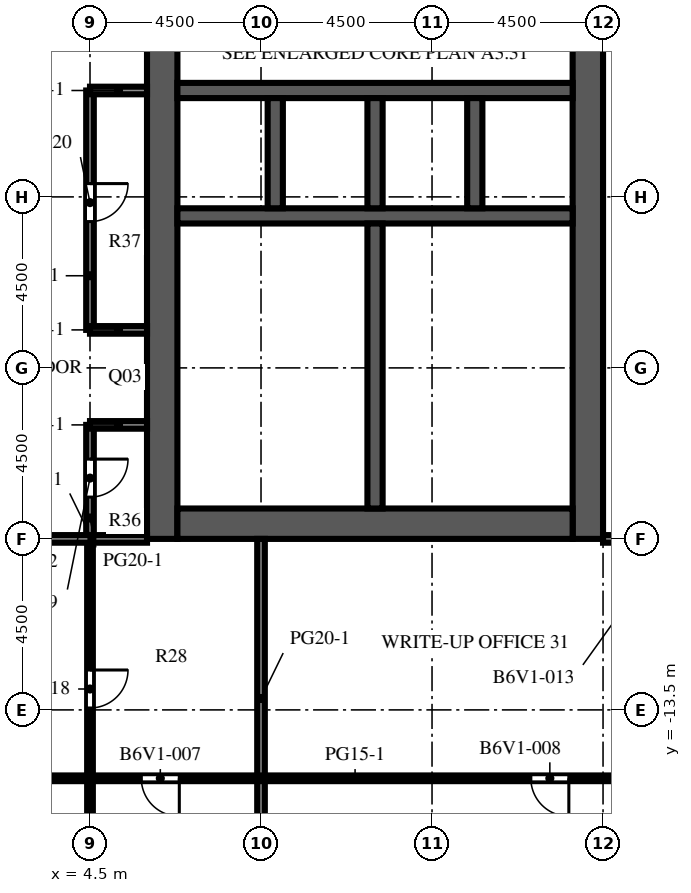
"""IFC4 building model, lengths in metres.
Left out: names, types, materials, properties, quantities, classifications, styles, units other than length and angle.
Written with IfcOpenShell. Run it as: python <this file> out.ifc"""

import sys

from ifc_helpers import new_model, si_unit, direction, frame, frame_2d, origin, place, context, subcontext, project, spatial, rectangle, extrude, element, fill, save


model = new_model("IFC4")
c1 = context("Model", 3, precision=1e-05, world=origin(), true_north=direction((0.0, 1.0)))
c2 = subcontext(c1, "Body", "Model", "MODEL_VIEW")
j1 = project(units=[si_unit("LENGTHUNIT", "METRE"), si_unit("PLANEANGLEUNIT", "RADIAN")], contexts=[c1])
p1 = place(None, origin())
s1 = spatial("IfcSite", under=j1, at=p1, CompositionType="ELEMENT")
p2 = place(p1, origin())
s2 = spatial("IfcBuilding", under=s1, at=p2, CompositionType="ELEMENT")
p3 = place(p2, frame((0.0, 0.0, 207.9)))
s3 = spatial("IfcBuildingStorey", under=s2, at=p3, CompositionType="ELEMENT", Elevation=207.9)
p4 = place(p3, frame((6.4, -9.0, 0.0), z_axis=(0.0, 0.0, 1.0), x_axis=(0.0, 1.0, 0.0)))
e1 = element("IfcWall", 1, at=p4, inside=s3, PredefinedType="SHEAR", context=c2, shape_type="SweptSolid", body=[
    extrude(rectangle(XDim=27.5, YDim=0.8, at=frame_2d((13.75, 0.0))), origin(), (0.0, 0.0, 1.0), 4.1),
])
p5 = place(p4, frame((12.55, 0.0, 0.0)))
e2 = element("IfcOpeningElement", 2, at=p5, cuts=e1, PredefinedType="OPENING", context=c2, shape_type="SweptSolid", body=[
    extrude(rectangle(XDim=2.4, YDim=2.4, at=frame_2d((1.2, 1.2))), frame((0.0, 0.41, 0.0), z_axis=(0.0, -1.0, 0.0), x_axis=(1.0, 0.0, 0.0)), (0.0, 0.0, 1.0), 0.82),
])
p6 = place(p4, frame((3.95, 0.0, 0.0)))
e3 = element("IfcOpeningElement", 3, at=p6, cuts=e1, PredefinedType="OPENING", context=c2, shape_type="SweptSolid", body=[
    extrude(rectangle(XDim=1.2, YDim=2.1, at=frame_2d((0.6, 1.05))), frame((0.0, 0.41, 0.0), z_axis=(0.0, -1.0, 0.0), x_axis=(1.0, 0.0, 0.0)), (0.0, 0.0, 1.0), 0.82),
])
p7 = place(p4, frame((22.35, 0.0, 0.0)))
e4 = element("IfcOpeningElement", 4, at=p7, cuts=e1, PredefinedType="OPENING", context=c2, shape_type="SweptSolid", body=[
    extrude(rectangle(XDim=1.2, YDim=2.1, at=frame_2d((0.6, 1.05))), frame((0.0, 0.41, 0.0), z_axis=(0.0, -1.0, 0.0), x_axis=(1.0, 0.0, 0.0)), (0.0, 0.0, 1.0), 0.82),
])
p8 = place(p3, frame((17.6, -9.0, 0.0), z_axis=(0.0, 0.0, 1.0), x_axis=(0.0, 1.0, 0.0)))
e5 = element("IfcWall", 5, at=p8, inside=s3, PredefinedType="SHEAR", context=c2, shape_type="SweptSolid", body=[
    extrude(rectangle(XDim=27.5, YDim=0.8, at=frame_2d((13.75, 0.0))), origin(), (0.0, 0.0, 1.0), 4.1),
])
p9 = place(p8, frame((12.55, 0.0, 0.0)))
e6 = element("IfcOpeningElement", 6, at=p9, cuts=e5, PredefinedType="OPENING", context=c2, shape_type="SweptSolid", body=[
    extrude(rectangle(XDim=2.4, YDim=2.4, at=frame_2d((1.2, 1.2))), frame((0.0, 0.41, 0.0), z_axis=(0.0, -1.0, 0.0), x_axis=(1.0, 0.0, 0.0)), (0.0, 0.0, 1.0), 0.82),
])
p10 = place(p8, frame((6.825, 0.0, 0.0)))
e7 = element("IfcOpeningElement", 7, at=p10, cuts=e5, PredefinedType="OPENING", context=c2, shape_type="SweptSolid", body=[
    extrude(rectangle(XDim=1.2, YDim=2.1, at=frame_2d((0.6, 1.05))), frame((0.0, 0.41, 0.0), z_axis=(0.0, -1.0, 0.0), x_axis=(1.0, 0.0, 0.0)), (0.0, 0.0, 1.0), 0.82),
])
p11 = place(p8, frame((19.475, 0.0, 0.0)))
e8 = element("IfcOpeningElement", 8, at=p11, cuts=e5, PredefinedType="OPENING", context=c2, shape_type="SweptSolid", body=[
    extrude(rectangle(XDim=1.2, YDim=2.1, at=frame_2d((0.6, 1.05))), frame((0.0, 0.41, 0.0), z_axis=(0.0, -1.0, 0.0), x_axis=(1.0, 0.0, 0.0)), (0.0, 0.0, 1.0), 0.82),
])
p12 = place(p3, frame((6.8, -8.6, 0.0), z_axis=(0.0, 0.0, 1.0), x_axis=(1.0, 0.0, 0.0)))
e9 = element("IfcWall", 9, at=p12, inside=s3, PredefinedType="SHEAR", context=c2, shape_type="SweptSolid", body=[
    extrude(rectangle(XDim=10.4, YDim=0.8, at=frame_2d((5.2, 0.0))), origin(), (0.0, 0.0, 1.0), 4.1),
])
p13 = place(p3, frame((6.8, -0.5, 0.0), z_axis=(0.0, 0.0, 1.0), x_axis=(1.0, 0.0, 0.0)))
e10 = element("IfcWall", 10, at=p13, inside=s3, PredefinedType="SHEAR", context=c2, shape_type="SweptSolid", body=[
    extrude(rectangle(XDim=10.4, YDim=0.4, at=frame_2d((5.2, 0.0))), origin(), (0.0, 0.0, 1.0), 4.1),
])
p14 = place(p3, frame((6.8, 2.8, 0.0), z_axis=(0.0, 0.0, 1.0), x_axis=(1.0, 0.0, 0.0)))
e11 = element("IfcWall", 11, at=p14, inside=s3, PredefinedType="SHEAR", context=c2, shape_type="SweptSolid", body=[
    extrude(rectangle(XDim=10.4, YDim=0.4, at=frame_2d((5.2, 0.0))), origin(), (0.0, 0.0, 1.0), 4.1),
])
p15 = place(p14, frame((0.738, 0.0, 0.0)))
e12 = element("IfcOpeningElement", 12, at=p15, cuts=e11, PredefinedType="OPENING", context=c2, shape_type="SweptSolid", body=[
    extrude(rectangle(XDim=1.1, YDim=2.1, at=frame_2d((0.55, 1.05))), frame((0.0, 0.21, 0.0), z_axis=(0.0, -1.0, 0.0), x_axis=(1.0, 0.0, 0.0)), (0.0, 0.0, 1.0), 0.42),
])
p16 = place(p14, frame((3.337, 0.0, 0.0)))
e13 = element("IfcOpeningElement", 13, at=p16, cuts=e11, PredefinedType="OPENING", context=c2, shape_type="SweptSolid", body=[
    extrude(rectangle(XDim=1.1, YDim=2.1, at=frame_2d((0.55, 1.05))), frame((0.0, 0.21, 0.0), z_axis=(0.0, -1.0, 0.0), x_axis=(1.0, 0.0, 0.0)), (0.0, 0.0, 1.0), 0.42),
])
p17 = place(p14, frame((6.012, 0.0, 0.0)))
e14 = element("IfcOpeningElement", 14, at=p17, cuts=e11, PredefinedType="OPENING", context=c2, shape_type="SweptSolid", body=[
    extrude(rectangle(XDim=1.0, YDim=2.1, at=frame_2d((0.5, 1.05))), frame((0.0, 0.21, 0.0), z_axis=(0.0, -1.0, 0.0), x_axis=(1.0, 0.0, 0.0)), (0.0, 0.0, 1.0), 0.42),
])
p18 = place(p14, frame((8.613, 0.0, 0.0)))
e15 = element("IfcOpeningElement", 15, at=p18, cuts=e11, PredefinedType="OPENING", context=c2, shape_type="SweptSolid", body=[
    extrude(rectangle(XDim=1.0, YDim=2.1, at=frame_2d((0.5, 1.05))), frame((0.0, 0.21, 0.0), z_axis=(0.0, -1.0, 0.0), x_axis=(1.0, 0.0, 0.0)), (0.0, 0.0, 1.0), 0.42),
])
for number, where, z_axis, x_axis in (
    (16, (9.375, -0.3, 0.0), (0.0, 0.0, 1.0), (0.0, 1.0, 0.0)),
    (17, (12.0, -0.3, 0.0), (0.0, 0.0, 1.0), (0.0, 1.0, 0.0)),
    (18, (14.625, -0.3, 0.0), (0.0, 0.0, 1.0), (0.0, 1.0, 0.0)),
):
    element("IfcWall", number, at=place(p3, frame(where, z_axis=z_axis, x_axis=x_axis)), inside=s3, PredefinedType="SHEAR", context=c2, shape_type="SweptSolid", body=[
        extrude(rectangle(XDim=2.9, YDim=0.4, at=frame_2d((1.45, 0.0))), origin(), (0.0, 0.0, 1.0), 4.1),
    ])
p19 = place(p3, frame((12.0, -8.2, 0.0), z_axis=(0.0, 0.0, 1.0), x_axis=(0.0, 1.0, 0.0)))
e19 = element("IfcWall", 19, at=p19, inside=s3, PredefinedType="SHEAR", context=c2, shape_type="SweptSolid", body=[
    extrude(rectangle(XDim=7.5, YDim=0.4, at=frame_2d((3.75, 0.0))), origin(), (0.0, 0.0, 1.0), 4.1),
])
p20 = place(p3, frame((8.3, -8.2, 0.0), z_axis=(0.0, 0.0, 1.0), x_axis=(0.0, 1.0, 0.0)))
e20 = element("IfcWall", 20, at=p20, inside=s3, PredefinedType="PARTITIONING", context=c2, shape_type="SweptSolid", body=[
    extrude(rectangle(XDim=2.25, YDim=0.1, at=frame_2d((1.125, 0.0))), origin(), (0.0, 0.0, 1.0), 3.65),
])
p21 = place(p20, frame((0.625, 0.0, 0.0)))
e21 = element("IfcOpeningElement", 21, at=p21, cuts=e20, PredefinedType="OPENING", context=c2, shape_type="SweptSolid", body=[
    extrude(rectangle(XDim=1.0, YDim=2.1, at=frame_2d((0.5, 1.05))), frame((0.0, 0.06, 0.0), z_axis=(0.0, -1.0, 0.0), x_axis=(1.0, 0.0, 0.0)), (0.0, 0.0, 1.0), 0.12),
])
p22 = place(p3, frame((8.3, -5.95, 0.0), z_axis=(0.0, 0.0, 1.0), x_axis=(0.0, 1.0, 0.0)))
e22 = element("IfcWall", 22, at=p22, inside=s3, PredefinedType="PARTITIONING", context=c2, shape_type="SweptSolid", body=[
    extrude(rectangle(XDim=2.25, YDim=0.1, at=frame_2d((1.125, 0.0))), origin(), (0.0, 0.0, 1.0), 3.65),
])
p23 = place(p22, frame((0.625, 0.0, 0.0)))
e23 = element("IfcOpeningElement", 23, at=p23, cuts=e22, PredefinedType="OPENING", context=c2, shape_type="SweptSolid", body=[
    extrude(rectangle(XDim=1.0, YDim=2.1, at=frame_2d((0.5, 1.05))), frame((0.0, 0.06, 0.0), z_axis=(0.0, -1.0, 0.0), x_axis=(1.0, 0.0, 0.0)), (0.0, 0.0, 1.0), 0.12),
])
p24 = place(p3, frame((8.3, -3.7, 0.0), z_axis=(0.0, 0.0, 1.0), x_axis=(0.0, 1.0, 0.0)))
e24 = element("IfcWall", 24, at=p24, inside=s3, PredefinedType="PARTITIONING", context=c2, shape_type="SweptSolid", body=[
    extrude(rectangle(XDim=1.65, YDim=0.1, at=frame_2d((0.825, 0.0))), origin(), (0.0, 0.0, 1.0), 3.65),
])
p25 = place(p24, frame((0.325, 0.0, 0.0)))
e25 = element("IfcOpeningElement", 25, at=p25, cuts=e24, PredefinedType="OPENING", context=c2, shape_type="SweptSolid", body=[
    extrude(rectangle(XDim=1.0, YDim=2.1, at=frame_2d((0.5, 1.05))), frame((0.0, 0.06, 0.0), z_axis=(0.0, -1.0, 0.0), x_axis=(1.0, 0.0, 0.0)), (0.0, 0.0, 1.0), 0.12),
])
p26 = place(p3, frame((8.3, -2.05, 0.0), z_axis=(0.0, 0.0, 1.0), x_axis=(0.0, 1.0, 0.0)))
e26 = element("IfcWall", 26, at=p26, inside=s3, PredefinedType="PARTITIONING", context=c2, shape_type="SweptSolid", body=[
    extrude(rectangle(XDim=1.35, YDim=0.1, at=frame_2d((0.675, 0.0))), origin(), (0.0, 0.0, 1.0), 3.65),
])
p27 = place(p26, frame((0.2, 0.0, 0.0)))
e27 = element("IfcOpeningElement", 27, at=p27, cuts=e26, PredefinedType="OPENING", context=c2, shape_type="SweptSolid", body=[
    extrude(rectangle(XDim=0.95, YDim=2.1, at=frame_2d((0.475, 1.05))), frame((0.0, 0.06, 0.0), z_axis=(0.0, -1.0, 0.0), x_axis=(1.0, 0.0, 0.0)), (0.0, 0.0, 1.0), 0.12),
])
for number, where, z_axis, x_axis in (
    (28, (8.3, -5.95, 0.0), (0.0, 0.0, 1.0), (1.0, 0.0, 0.0)),
    (29, (8.3, -3.7, 0.0), (0.0, 0.0, 1.0), (1.0, 0.0, 0.0)),
    (30, (8.3, -2.05, 0.0), (0.0, 0.0, 1.0), (1.0, 0.0, 0.0)),
):
    element("IfcWall", number, at=place(p3, frame(where, z_axis=z_axis, x_axis=x_axis)), inside=s3, PredefinedType="PARTITIONING", context=c2, shape_type="SweptSolid", body=[
        extrude(rectangle(XDim=3.5, YDim=0.1, at=frame_2d((1.75, 0.0))), origin(), (0.0, 0.0, 1.0), 3.65),
    ])
p28 = place(p3, frame((4.5, -9.0, 0.0), z_axis=(0.0, 0.0, 1.0), x_axis=(0.0, -1.0, 0.0)))
e31 = element("IfcWall", 31, at=p28, inside=s3, PredefinedType="PARTITIONING", context=c2, shape_type="SweptSolid", body=[
    extrude(rectangle(XDim=17.5, YDim=0.15, at=frame_2d((8.75, 0.0))), origin(), (0.0, 0.0, 1.0), 3.65),
])
p29 = place(p28, frame((3.45, 0.0, 0.0)))
e32 = element("IfcOpeningElement", 32, at=p29, cuts=e31, PredefinedType="OPENING", context=c2, shape_type="SweptSolid", body=[
    extrude(rectangle(XDim=1.0, YDim=2.1, at=frame_2d((0.5, 1.05))), frame((0.0, 0.085, 0.0), z_axis=(0.0, -1.0, 0.0), x_axis=(1.0, 0.0, 0.0)), (0.0, 0.0, 1.0), 0.17),
])
p30 = place(p3, frame((4.5, -6.0, 0.0), z_axis=(0.0, 0.0, 1.0), x_axis=(0.0, -1.0, 0.0)))
e33 = element("IfcWall", 33, at=p30, inside=s3, PredefinedType="PARTITIONING", context=c2, shape_type="SweptSolid", body=[
    extrude(rectangle(XDim=3.0, YDim=0.2, at=frame_2d((1.5, 0.0))), origin(), (0.0, 0.0, 1.0), 3.65),
])
p31 = place(p30, frame((0.9, 0.0, 0.0)))
e34 = element("IfcOpeningElement", 34, at=p31, cuts=e33, PredefinedType="OPENING", context=c2, shape_type="SweptSolid", body=[
    extrude(rectangle(XDim=1.0, YDim=2.1, at=frame_2d((0.5, 1.05))), frame((0.0, 0.11, 0.0), z_axis=(0.0, -1.0, 0.0), x_axis=(1.0, 0.0, 0.0)), (0.0, 0.0, 1.0), 0.22),
])
p32 = place(p3, frame((4.5, 2.8, 0.0), z_axis=(0.0, 0.0, 1.0), x_axis=(0.0, -1.0, 0.0)))
e35 = element("IfcWall", 35, at=p32, inside=s3, PredefinedType="PARTITIONING", context=c2, shape_type="SweptSolid", body=[
    extrude(rectangle(XDim=6.3, YDim=0.2, at=frame_2d((3.15, 0.0))), origin(), (0.0, 0.0, 1.0), 3.65),
])
p33 = place(p32, frame((2.45, 0.0, 0.0)))
e36 = element("IfcOpeningElement", 36, at=p33, cuts=e35, PredefinedType="OPENING", context=c2, shape_type="SweptSolid", body=[
    extrude(rectangle(XDim=1.0, YDim=2.1, at=frame_2d((0.5, 1.05))), frame((0.0, 0.11, 0.0), z_axis=(0.0, -1.0, 0.0), x_axis=(1.0, 0.0, 0.0)), (0.0, 0.0, 1.0), 0.22),
])
p34 = place(p3, frame((9.0, -17.4, 0.0), z_axis=(0.0, 0.0, 1.0), x_axis=(0.0, 1.0, 0.0)))
e37 = element("IfcWall", 37, at=p34, inside=s3, PredefinedType="PARTITIONING", context=c2, shape_type="SweptSolid", body=[
    extrude(rectangle(XDim=8.4, YDim=0.2, at=frame_2d((4.2, 0.0))), origin(), (0.0, 0.0, 1.0), 3.65),
])
p35 = place(p3, frame((21.0, -15.3, 0.0), z_axis=(0.0, 0.0, 1.0), x_axis=(-1.0, 0.0, 0.0)))
e38 = element("IfcWall", 38, at=p35, inside=s3, PredefinedType="PARTITIONING", context=c2, shape_type="SweptSolid", body=[
    extrude(rectangle(XDim=34.5, YDim=0.15, at=frame_2d((17.25, 0.0))), origin(), (0.0, 0.0, 1.0), 3.65),
])
p36 = place(p35, frame((28.9, 0.0, 0.0)))
e39 = element("IfcOpeningElement", 39, at=p36, cuts=e38, PredefinedType="OPENING", context=c2, shape_type="SweptSolid", body=[
    extrude(rectangle(XDim=1.0, YDim=2.1, at=frame_2d((0.5, 1.05))), frame((0.0, 0.085, 0.0), z_axis=(0.0, -1.0, 0.0), x_axis=(1.0, 0.0, 0.0)), (0.0, 0.0, 1.0), 0.17),
])
p37 = place(p35, frame((19.4, 0.0, 0.0)))
e40 = element("IfcOpeningElement", 40, at=p37, cuts=e38, PredefinedType="OPENING", context=c2, shape_type="SweptSolid", body=[
    extrude(rectangle(XDim=1.0, YDim=2.1, at=frame_2d((0.5, 1.05))), frame((0.0, 0.085, 0.0), z_axis=(0.0, -1.0, 0.0), x_axis=(1.0, 0.0, 0.0)), (0.0, 0.0, 1.0), 0.17),
])
p38 = place(p35, frame((14.15, 0.0, 0.0)))
e41 = element("IfcOpeningElement", 41, at=p38, cuts=e38, PredefinedType="OPENING", context=c2, shape_type="SweptSolid", body=[
    extrude(rectangle(XDim=1.0, YDim=2.1, at=frame_2d((0.5, 1.05))), frame((0.0, 0.085, 0.0), z_axis=(0.0, -1.0, 0.0), x_axis=(1.0, 0.0, 0.0)), (0.0, 0.0, 1.0), 0.17),
])
p39 = place(p35, frame((3.9, 0.0, 0.0)))
e42 = element("IfcOpeningElement", 42, at=p39, cuts=e38, PredefinedType="OPENING", context=c2, shape_type="SweptSolid", body=[
    extrude(rectangle(XDim=1.0, YDim=2.1, at=frame_2d((0.5, 1.05))), frame((0.0, 0.085, 0.0), z_axis=(0.0, -1.0, 0.0), x_axis=(1.0, 0.0, 0.0)), (0.0, 0.0, 1.0), 0.17),
])
p40 = place(p3, frame((6.0, -9.0, 0.0), z_axis=(0.0, 0.0, 1.0), x_axis=(-1.0, 0.0, 0.0)))
e43 = element("IfcWall", 43, at=p40, inside=s3, PredefinedType="PARTITIONING", context=c2, shape_type="SweptSolid", body=[
    extrude(rectangle(XDim=4.5, YDim=0.2, at=frame_2d((2.25, 0.0))), origin(), (0.0, 0.0, 1.0), 3.65),
])
p41 = place(p40, frame((2.9, 0.0, 0.0)))
e44 = element("IfcOpeningElement", 44, at=p41, cuts=e43, PredefinedType="OPENING", context=c2, shape_type="SweptSolid", body=[
    extrude(rectangle(XDim=1.0, YDim=2.1, at=frame_2d((0.5, 1.05))), frame((0.0, 0.11, 0.0), z_axis=(0.0, -1.0, 0.0), x_axis=(1.0, 0.0, 0.0)), (0.0, 0.0, 1.0), 0.22),
])
p42 = place(p3, frame((21.0, -9.0, 0.0), z_axis=(0.0, 0.0, 1.0), x_axis=(-1.0, 0.0, 0.0)))
e45 = element("IfcWall", 45, at=p42, inside=s3, PredefinedType="PARTITIONING", context=c2, shape_type="SweptSolid", body=[
    extrude(rectangle(XDim=3.0, YDim=0.2, at=frame_2d((1.5, 0.0))), origin(), (0.0, 0.0, 1.0), 3.65),
])
p43 = place(p42, frame((0.65, 0.0, 0.0)))
e46 = element("IfcOpeningElement", 46, at=p43, cuts=e45, PredefinedType="OPENING", context=c2, shape_type="SweptSolid", body=[
    extrude(rectangle(XDim=1.0, YDim=2.1, at=frame_2d((0.5, 1.05))), frame((0.0, 0.11, 0.0), z_axis=(0.0, -1.0, 0.0), x_axis=(1.0, 0.0, 0.0)), (0.0, 0.0, 1.0), 0.22),
])
for number, where, z_axis, x_axis in (
    (47, (4.5, -6.0, 0.0), (0.0, 0.0, 1.0), (1.0, 0.0, 0.0)),
    (48, (4.5, -3.5, 0.0), (0.0, 0.0, 1.0), (1.0, 0.0, 0.0)),
    (49, (4.5, 2.8, 0.0), (0.0, 0.0, 1.0), (1.0, 0.0, 0.0)),
):
    element("IfcWall", number, at=place(p3, frame(where, z_axis=z_axis, x_axis=x_axis)), inside=s3, PredefinedType="PARTITIONING", context=c2, shape_type="SweptSolid", body=[
        extrude(rectangle(XDim=1.5, YDim=0.2, at=frame_2d((0.75, 0.0))), origin(), (0.0, 0.0, 1.0), 3.65),
    ])
p44 = place(p15, origin())
e50 = element("IfcDoor", 50, at=p44, inside=s3, OperationType="DOUBLE_DOOR_SLIDING", PredefinedType="DOOR", context=c2, shape_type="SweptSolid", body=[
    extrude(rectangle(XDim=1.1, YDim=2.1, at=frame_2d((0.55, 1.05))), frame((0.0, 0.025, 0.0), z_axis=(0.0, -1.0, 0.0), x_axis=(1.0, 0.0, 0.0)), (0.0, 0.0, 1.0), 0.05),
])
fill(e12, e50)
p45 = place(p16, origin())
e51 = element("IfcDoor", 51, at=p45, inside=s3, OperationType="DOUBLE_DOOR_SLIDING", PredefinedType="DOOR", context=c2, shape_type="SweptSolid", body=[
    extrude(rectangle(XDim=1.1, YDim=2.1, at=frame_2d((0.55, 1.05))), frame((0.0, 0.025, 0.0), z_axis=(0.0, -1.0, 0.0), x_axis=(1.0, 0.0, 0.0)), (0.0, 0.0, 1.0), 0.05),
])
fill(e13, e51)
p46 = place(p5, origin())
e52 = element("IfcDoor", 52, at=p46, inside=s3, OperationType="DOUBLE_DOOR_DOUBLE_SWING", PredefinedType="DOOR", context=c2, shape_type="SweptSolid", body=[
    extrude(rectangle(XDim=2.4, YDim=2.4, at=frame_2d((1.2, 1.2))), frame((0.0, 0.025, 0.0), z_axis=(0.0, -1.0, 0.0), x_axis=(1.0, 0.0, 0.0)), (0.0, 0.0, 1.0), 0.05),
])
fill(e2, e52)
p47 = place(p9, origin())
e53 = element("IfcDoor", 53, at=p47, inside=s3, OperationType="DOUBLE_DOOR_DOUBLE_SWING", PredefinedType="DOOR", context=c2, shape_type="SweptSolid", body=[
    extrude(rectangle(XDim=2.4, YDim=2.4, at=frame_2d((1.2, 1.2))), frame((0.0, 0.025, 0.0), z_axis=(0.0, -1.0, 0.0), x_axis=(1.0, 0.0, 0.0)), (0.0, 0.0, 1.0), 0.05),
])
fill(e6, e53)
p48 = place(p10, frame((1.2, 0.0, 0.0), z_axis=(0.0, 0.0, 1.0), x_axis=(-1.0, 0.0, 0.0)))
e54 = element("IfcDoor", 54, at=p48, inside=s3, OperationType="SINGLE_SWING_LEFT", PredefinedType="DOOR", context=c2, shape_type="SweptSolid", body=[
    extrude(rectangle(XDim=1.2, YDim=2.1, at=frame_2d((0.6, 1.05))), frame((0.0, 0.025, 0.0), z_axis=(0.0, -1.0, 0.0), x_axis=(1.0, 0.0, 0.0)), (0.0, 0.0, 1.0), 0.05),
])
fill(e7, e54)
p49 = place(p17, origin())
e55 = element("IfcDoor", 55, at=p49, inside=s3, OperationType="SINGLE_SWING_LEFT", PredefinedType="DOOR", context=c2, shape_type="SweptSolid", body=[
    extrude(rectangle(XDim=1.0, YDim=2.1, at=frame_2d((0.5, 1.05))), frame((0.0, 0.025, 0.0), z_axis=(0.0, -1.0, 0.0), x_axis=(1.0, 0.0, 0.0)), (0.0, 0.0, 1.0), 0.05),
])
fill(e14, e55)
p50 = place(p18, origin())
e56 = element("IfcDoor", 56, at=p50, inside=s3, OperationType="SINGLE_SWING_RIGHT", PredefinedType="DOOR", context=c2, shape_type="SweptSolid", body=[
    extrude(rectangle(XDim=1.0, YDim=2.1, at=frame_2d((0.5, 1.05))), frame((0.0, 0.025, 0.0), z_axis=(0.0, -1.0, 0.0), x_axis=(1.0, 0.0, 0.0)), (0.0, 0.0, 1.0), 0.05),
])
fill(e15, e56)
p51 = place(p6, origin())
e57 = element("IfcDoor", 57, at=p51, inside=s3, OperationType="SINGLE_SWING_RIGHT", PredefinedType="DOOR", context=c2, shape_type="SweptSolid", body=[
    extrude(rectangle(XDim=1.2, YDim=2.1, at=frame_2d((0.6, 1.05))), frame((0.0, -0.325, 0.0), z_axis=(0.0, -1.0, 0.0), x_axis=(1.0, 0.0, 0.0)), (0.0, 0.0, 1.0), 0.05),
])
fill(e3, e57)
p52 = place(p21, origin())
e58 = element("IfcDoor", 58, at=p52, inside=s3, OperationType="SINGLE_SWING_LEFT", PredefinedType="DOOR", context=c2, shape_type="SweptSolid", body=[
    extrude(rectangle(XDim=1.0, YDim=2.1, at=frame_2d((0.5, 1.05))), frame((0.0, 0.025, 0.0), z_axis=(0.0, -1.0, 0.0), x_axis=(1.0, 0.0, 0.0)), (0.0, 0.0, 1.0), 0.05),
])
fill(e21, e58)
p53 = place(p23, origin())
e59 = element("IfcDoor", 59, at=p53, inside=s3, OperationType="SINGLE_SWING_RIGHT", PredefinedType="DOOR", context=c2, shape_type="SweptSolid", body=[
    extrude(rectangle(XDim=1.0, YDim=2.1, at=frame_2d((0.5, 1.05))), frame((0.0, 0.025, 0.0), z_axis=(0.0, -1.0, 0.0), x_axis=(1.0, 0.0, 0.0)), (0.0, 0.0, 1.0), 0.05),
])
fill(e23, e59)
p54 = place(p25, origin())
e60 = element("IfcDoor", 60, at=p54, inside=s3, OperationType="SINGLE_SWING_LEFT", PredefinedType="DOOR", context=c2, shape_type="SweptSolid", body=[
    extrude(rectangle(XDim=1.0, YDim=2.1, at=frame_2d((0.5, 1.05))), frame((0.0, 0.025, 0.0), z_axis=(0.0, -1.0, 0.0), x_axis=(1.0, 0.0, 0.0)), (0.0, 0.0, 1.0), 0.05),
])
fill(e25, e60)
p55 = place(p27, origin())
e61 = element("IfcDoor", 61, at=p55, inside=s3, OperationType="SINGLE_SWING_RIGHT", PredefinedType="DOOR", context=c2, shape_type="SweptSolid", body=[
    extrude(rectangle(XDim=0.95, YDim=2.1, at=frame_2d((0.475, 1.05))), frame((0.0, 0.025, 0.0), z_axis=(0.0, -1.0, 0.0), x_axis=(1.0, 0.0, 0.0)), (0.0, 0.0, 1.0), 0.05),
])
fill(e27, e61)
p56 = place(p38, origin())
e62 = element("IfcDoor", 62, at=p56, inside=s3, OperationType="SINGLE_SWING_LEFT", PredefinedType="DOOR", context=c2, shape_type="SweptSolid", body=[
    extrude(rectangle(XDim=1.0, YDim=2.1, at=frame_2d((0.5, 1.05))), frame((0.0, 0.025, 0.0), z_axis=(0.0, -1.0, 0.0), x_axis=(1.0, 0.0, 0.0)), (0.0, 0.0, 1.0), 0.05),
])
fill(e41, e62)
p57 = place(p39, origin())
e63 = element("IfcDoor", 63, at=p57, inside=s3, OperationType="SINGLE_SWING_LEFT", PredefinedType="DOOR", context=c2, shape_type="SweptSolid", body=[
    extrude(rectangle(XDim=1.0, YDim=2.1, at=frame_2d((0.5, 1.05))), frame((0.0, 0.025, 0.0), z_axis=(0.0, -1.0, 0.0), x_axis=(1.0, 0.0, 0.0)), (0.0, 0.0, 1.0), 0.05),
])
fill(e42, e63)
p58 = place(p29, origin())
e64 = element("IfcDoor", 64, at=p58, inside=s3, OperationType="SINGLE_SWING_LEFT", PredefinedType="DOOR", context=c2, shape_type="SweptSolid", body=[
    extrude(rectangle(XDim=1.0, YDim=2.1, at=frame_2d((0.5, 1.05))), frame((0.0, 0.025, 0.0), z_axis=(0.0, -1.0, 0.0), x_axis=(1.0, 0.0, 0.0)), (0.0, 0.0, 1.0), 0.05),
])
fill(e32, e64)
p59 = place(p31, origin())
e65 = element("IfcDoor", 65, at=p59, inside=s3, OperationType="SINGLE_SWING_LEFT", PredefinedType="DOOR", context=c2, shape_type="SweptSolid", body=[
    extrude(rectangle(XDim=1.0, YDim=2.1, at=frame_2d((0.5, 1.05))), frame((0.0, 0.025, 0.0), z_axis=(0.0, -1.0, 0.0), x_axis=(1.0, 0.0, 0.0)), (0.0, 0.0, 1.0), 0.05),
])
fill(e34, e65)
p60 = place(p33, origin())
e66 = element("IfcDoor", 66, at=p60, inside=s3, OperationType="SINGLE_SWING_LEFT", PredefinedType="DOOR", context=c2, shape_type="SweptSolid", body=[
    extrude(rectangle(XDim=1.0, YDim=2.1, at=frame_2d((0.5, 1.05))), frame((0.0, 0.025, 0.0), z_axis=(0.0, -1.0, 0.0), x_axis=(1.0, 0.0, 0.0)), (0.0, 0.0, 1.0), 0.05),
])
fill(e36, e66)
save(model, sys.argv[1])
